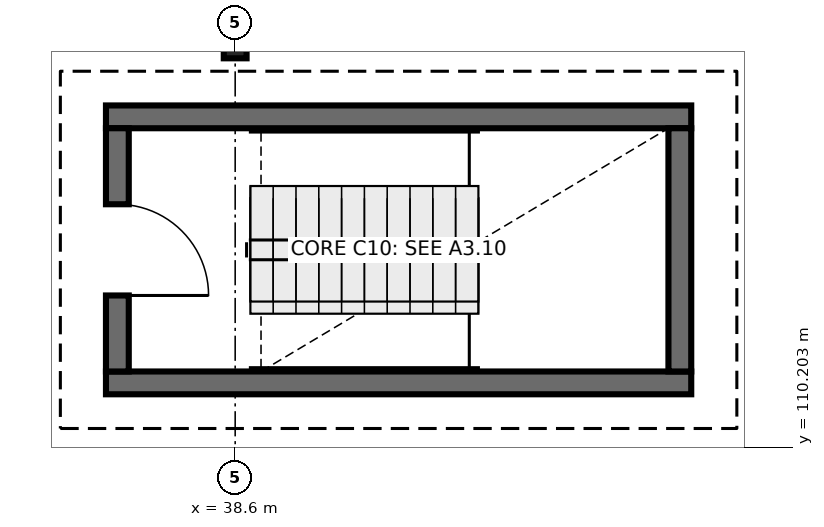
"""IFC4 building model, lengths in metres.
Left out: names, types, materials, properties, quantities, classifications, styles, units other than length and angle.
Written with IfcOpenShell. Run it as: python <this file> out.ifc"""

import sys

from ifc_helpers import new_model, si_unit, direction, frame, frame_2d, origin, origin_2d, place, context, subcontext, project, spatial, rectangle, i_section, extrude, element, fill, save


model = new_model("IFC4")
c1 = context("Model", 3, precision=1e-05, world=origin(), true_north=direction((0.0, 1.0)))
c2 = subcontext(c1, "Body", "Model", "MODEL_VIEW")
j1 = project(units=[si_unit("LENGTHUNIT", "METRE"), si_unit("PLANEANGLEUNIT", "RADIAN")], contexts=[c1])
p1 = place(None, origin())
s1 = spatial("IfcSite", under=j1, at=p1, CompositionType="ELEMENT")
p2 = place(p1, origin())
s2 = spatial("IfcBuilding", under=s1, at=p2, CompositionType="ELEMENT")
p3 = place(p2, frame((0.0, 0.0, 22.8)))
s3 = spatial("IfcBuildingStorey", under=s2, at=p3, CompositionType="ELEMENT", Elevation=22.8)
p4 = place(p3, frame((38.6, 115.5, 0.0), z_axis=(0.0, 0.0, 1.0), x_axis=(1.0, 0.0, 0.0)))
e1 = element("IfcColumn", 1, at=p4, inside=s3, PredefinedType="COLUMN", context=c2, shape_type="SweptSolid", body=[
    extrude(i_section(OverallWidth=0.3, OverallDepth=0.36, WebThickness=0.012, FlangeThickness=0.022, FilletRadius=0.027, at=origin_2d()), origin(), (0.0, 0.0, 1.0), 3.9),
])
for number, where, z_axis, x_axis in (
    (2, (36.9, 111.05, 0.0), (0.0, 0.0, 1.0), (1.0, 0.0, 0.0)),
    (3, (44.6, 114.55, 0.0), (0.0, 0.0, 1.0), (-1.0, 0.0, 0.0)),
):
    element("IfcWall", number, at=place(p3, frame(where, z_axis=z_axis, x_axis=x_axis)), inside=s3, PredefinedType="SHEAR", context=c2, shape_type="SweptSolid", body=[
        extrude(rectangle(XDim=7.7, YDim=0.3, at=frame_2d((3.85, 0.0))), origin(), (0.0, 0.0, 1.0), 3.9),
    ])
p5 = place(p3, frame((37.05, 114.4, 0.0), z_axis=(0.0, 0.0, 1.0), x_axis=(0.0, -1.0, 0.0)))
e4 = element("IfcWall", 4, at=p5, inside=s3, PredefinedType="SHEAR", context=c2, shape_type="SweptSolid", body=[
    extrude(rectangle(XDim=3.2, YDim=0.3, at=frame_2d((1.6, 0.0))), origin(), (0.0, 0.0, 1.0), 3.9),
])
p6 = place(p5, frame((1.0, 0.0, 0.0)))
e5 = element("IfcOpeningElement", 5, at=p6, cuts=e4, PredefinedType="OPENING", context=c2, shape_type="SweptSolid", body=[
    extrude(rectangle(XDim=1.2, YDim=2.15, at=frame_2d((0.6, 1.075))), frame((0.0, 0.16, 0.0), z_axis=(0.0, -1.0, 0.0), x_axis=(1.0, 0.0, 0.0)), (0.0, 0.0, 1.0), 0.32),
])
p7 = place(p3, frame((44.45, 111.2, 0.0), z_axis=(0.0, 0.0, 1.0), x_axis=(0.0, 1.0, 0.0)))
e6 = element("IfcWall", 6, at=p7, inside=s3, PredefinedType="SHEAR", context=c2, shape_type="SweptSolid", body=[
    extrude(rectangle(XDim=3.2, YDim=0.3, at=frame_2d((1.6, 0.0))), origin(), (0.0, 0.0, 1.0), 3.9),
])
p8 = place(p6, origin())
e7 = element("IfcDoor", 7, at=p8, inside=s3, OperationType="SINGLE_SWING_RIGHT", PredefinedType="DOOR", context=c2, shape_type="SweptSolid", body=[
    extrude(rectangle(XDim=1.2, YDim=2.15, at=frame_2d((0.6, 1.075))), frame((0.0, 0.025, 0.0), z_axis=(0.0, -1.0, 0.0), x_axis=(1.0, 0.0, 0.0)), (0.0, 0.0, 1.0), 0.05),
])
fill(e5, e7)
save(model, sys.argv[1])
